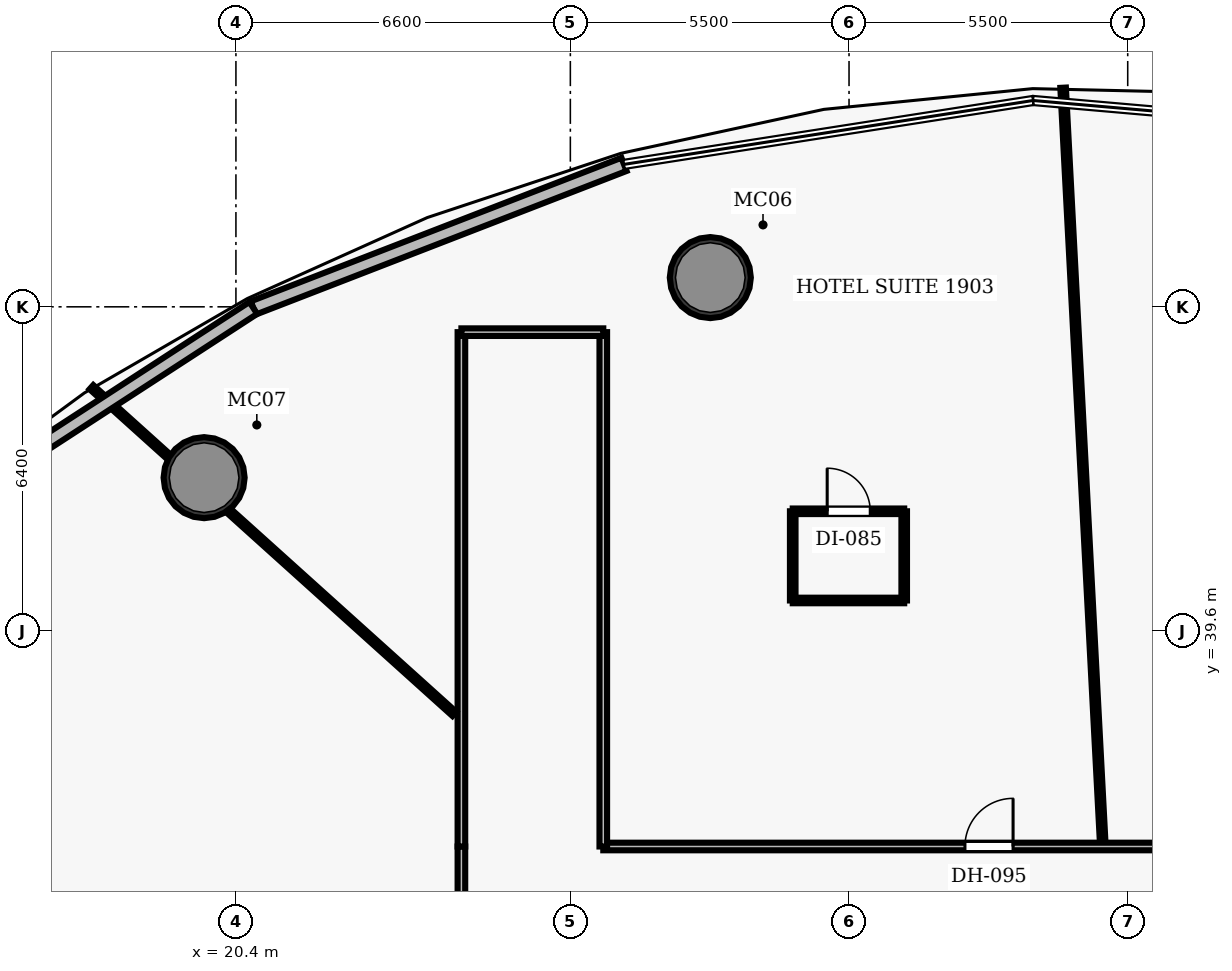
"""IFC4 building model, lengths in metres.
Left out: names, types, materials, properties, quantities, classifications, styles, units other than length and angle.
Written with IfcOpenShell. Run it as: python <this file> out.ifc"""

import sys

from ifc_helpers import new_model, si_unit, direction, frame, frame_2d, origin, origin_2d, place, context, subcontext, project, spatial, rectangle, hollow_circle, extrude, element, fill, save


model = new_model("IFC4")
c1 = context("Model", 3, precision=1e-05, world=origin(), true_north=direction((0.0, 1.0)))
c2 = subcontext(c1, "Body", "Model", "MODEL_VIEW")
j1 = project(units=[si_unit("LENGTHUNIT", "METRE"), si_unit("PLANEANGLEUNIT", "RADIAN")], contexts=[c1])
p1 = place(None, origin())
s1 = spatial("IfcSite", under=j1, at=p1, CompositionType="ELEMENT")
p2 = place(p1, origin())
s2 = spatial("IfcBuilding", under=s1, at=p2, CompositionType="ELEMENT")
p3 = place(p2, frame((0.0, 0.0, 83.4)))
s3 = spatial("IfcBuildingStorey", under=s2, at=p3, CompositionType="ELEMENT", Elevation=83.4)
for number, where, z_axis, x_axis in (
    (1, (29.762, 46.577, 0.0), (0.0, 0.0, 1.0), (1.0, 0.0, 0.0)),
    (2, (19.772, 42.629, 0.0), (0.0, 0.0, 1.0), (1.0, 0.0, 0.0)),
):
    element("IfcColumn", number, at=place(p3, frame(where, z_axis=z_axis, x_axis=x_axis)), inside=s3, PredefinedType="COLUMN", context=c2, shape_type="SweptSolid", body=[
        extrude(hollow_circle(Radius=0.8, WallThickness=0.06, at=origin_2d()), origin(), (0.0, 0.0, 1.0), 3.5),
    ])
p4 = place(p3, frame((27.65, 35.35, 0.0), z_axis=(0.0, 0.0, 1.0), x_axis=(1.0, 0.0, 0.0)))
e3 = element("IfcWall", 3, at=p4, inside=s3, PredefinedType="PARTITIONING", context=c2, shape_type="SweptSolid", body=[
    extrude(rectangle(XDim=23.5, YDim=0.15, at=frame_2d((11.75, 0.0))), origin(), (0.0, 0.0, 1.0), 2.6),
])
p5 = place(p4, frame((11.493, 0.0, 0.0)))
e4 = element("IfcOpeningElement", 4, at=p5, cuts=e3, PredefinedType="OPENING", context=c2, shape_type="SweptSolid", body=[
    extrude(rectangle(XDim=0.95, YDim=2.15, at=frame_2d((0.475, 1.075))), frame((0.0, 0.085, 0.0), z_axis=(0.0, -1.0, 0.0), x_axis=(1.0, 0.0, 0.0)), (0.0, 0.0, 1.0), 0.17),
])
p6 = place(p4, frame((7.137, 0.0, 0.0)))
e5 = element("IfcOpeningElement", 5, at=p6, cuts=e3, PredefinedType="OPENING", context=c2, shape_type="SweptSolid", body=[
    extrude(rectangle(XDim=0.95, YDim=2.15, at=frame_2d((0.475, 1.075))), frame((0.0, 0.085, 0.0), z_axis=(0.0, -1.0, 0.0), x_axis=(1.0, 0.0, 0.0)), (0.0, 0.0, 1.0), 0.17),
])
p7 = place(p3, frame((24.85, 19.45, 0.0), z_axis=(0.0, 0.0, 1.0), x_axis=(0.0, 1.0, 0.0)))
e6 = element("IfcWall", 6, at=p7, inside=s3, PredefinedType="PARTITIONING", context=c2, shape_type="SweptSolid", body=[
    extrude(rectangle(XDim=15.9, YDim=0.15, at=frame_2d((7.95, 0.0))), origin(), (0.0, 0.0, 1.0), 2.6),
])
p8 = place(p7, frame((7.669, 0.0, 0.0)))
e7 = element("IfcOpeningElement", 7, at=p8, cuts=e6, PredefinedType="OPENING", context=c2, shape_type="SweptSolid", body=[
    extrude(rectangle(XDim=0.95, YDim=2.15, at=frame_2d((0.475, 1.075))), frame((0.0, 0.085, 0.0), z_axis=(0.0, -1.0, 0.0), x_axis=(1.0, 0.0, 0.0)), (0.0, 0.0, 1.0), 0.17),
])
p9 = place(p7, frame((4.138, 0.0, 0.0)))
e8 = element("IfcOpeningElement", 8, at=p9, cuts=e6, PredefinedType="OPENING", context=c2, shape_type="SweptSolid", body=[
    extrude(rectangle(XDim=0.95, YDim=2.15, at=frame_2d((0.475, 1.075))), frame((0.0, 0.085, 0.0), z_axis=(0.0, -1.0, 0.0), x_axis=(1.0, 0.0, 0.0)), (0.0, 0.0, 1.0), 0.17),
])
for number, where, z_axis, x_axis in (
    (9, (24.85, 35.35, 0.0), (0.0, 0.0, 1.0), (0.0, 1.0, 0.0)),
    (10, (27.65, 35.35, 0.0), (0.0, 0.0, 1.0), (0.0, 1.0, 0.0)),
):
    element("IfcWall", number, at=place(p3, frame(where, z_axis=z_axis, x_axis=x_axis)), inside=s3, PredefinedType="PARTITIONING", context=c2, shape_type="SweptSolid", body=[
        extrude(rectangle(XDim=10.15, YDim=0.15, at=frame_2d((5.075, 0.0))), origin(), (0.0, 0.0, 1.0), 2.6),
    ])
p10 = place(p3, frame((24.85, 45.5, 0.0), z_axis=(0.0, 0.0, 1.0), x_axis=(1.0, 0.0, 0.0)))
e11 = element("IfcWall", 11, at=p10, inside=s3, PredefinedType="PARTITIONING", context=c2, shape_type="SweptSolid", body=[
    extrude(rectangle(XDim=2.8, YDim=0.15, at=frame_2d((1.4, 0.0))), origin(), (0.0, 0.0, 1.0), 2.6),
])
p11 = place(p3, frame((37.503, 35.49, 0.0), z_axis=(0.0, 0.0, 1.0), x_axis=(-0.052346625091, 0.998628975567, 0.0)))
e12 = element("IfcWall", 12, at=p11, inside=s3, PredefinedType="PARTITIONING", context=c2, shape_type="SweptSolid", body=[
    extrude(rectangle(XDim=14.854, YDim=0.11, at=frame_2d((7.427, 0.0))), origin(), (0.0, 0.0, 1.0), 2.6),
])
p12 = place(p3, frame((24.71, 37.966, 0.0), z_axis=(0.0, 0.0, 1.0), x_axis=(-0.743136670625, 0.669139663129, 0.0)))
e13 = element("IfcWall", 13, at=p12, inside=s3, PredefinedType="PARTITIONING", context=c2, shape_type="SweptSolid", body=[
    extrude(rectangle(XDim=9.637, YDim=0.11, at=frame_2d((4.819, 0.0))), origin(), (0.0, 0.0, 1.0), 2.6),
])
p13 = place(p3, frame((31.389, 40.205, 0.0), z_axis=(0.0, 0.0, 1.0), x_axis=(1.0, 0.0, 0.0)))
e14 = element("IfcWall", 14, at=p13, inside=s3, PredefinedType="PARTITIONING", context=c2, shape_type="SweptSolid", body=[
    extrude(rectangle(XDim=2.2, YDim=0.11, at=frame_2d((1.1, 0.0))), origin(), (0.0, 0.0, 1.0), 2.6),
])
p14 = place(p3, frame((31.389, 41.965, 0.0), z_axis=(0.0, 0.0, 1.0), x_axis=(1.0, 0.0, 0.0)))
e15 = element("IfcWall", 15, at=p14, inside=s3, PredefinedType="PARTITIONING", context=c2, shape_type="SweptSolid", body=[
    extrude(rectangle(XDim=2.2, YDim=0.11, at=frame_2d((1.1, 0.0))), origin(), (0.0, 0.0, 1.0), 2.6),
])
p15 = place(p14, frame((0.68, 0.0, 0.0)))
e16 = element("IfcOpeningElement", 16, at=p15, cuts=e15, PredefinedType="OPENING", context=c2, shape_type="SweptSolid", body=[
    extrude(rectangle(XDim=0.85, YDim=2.1, at=frame_2d((0.425, 1.05))), frame((0.0, 0.065, 0.0), z_axis=(0.0, -1.0, 0.0), x_axis=(1.0, 0.0, 0.0)), (0.0, 0.0, 1.0), 0.13),
])
for number, where, z_axis, x_axis in (
    (17, (31.389, 40.205, 0.0), (0.0, 0.0, 1.0), (0.0, 1.0, 0.0)),
    (18, (33.589, 40.205, 0.0), (0.0, 0.0, 1.0), (0.0, 1.0, 0.0)),
):
    element("IfcWall", number, at=place(p3, frame(where, z_axis=z_axis, x_axis=x_axis)), inside=s3, PredefinedType="PARTITIONING", context=c2, shape_type="SweptSolid", body=[
        extrude(rectangle(XDim=1.76, YDim=0.11, at=frame_2d((0.88, 0.0))), origin(), (0.0, 0.0, 1.0), 2.6),
    ])
p16 = place(p3, frame((20.743, 45.978, 0.0), z_axis=(0.0, 0.0, 1.0), x_axis=(0.932529903386, 0.361092757183, 0.0)))
e19 = element("IfcWall", 19, at=p16, inside=s3, PredefinedType="SOLIDWALL", context=c2, shape_type="SweptSolid", body=[
    extrude(rectangle(XDim=7.845, YDim=0.28, at=frame_2d((3.922, 0.0))), origin(), (0.0, 0.0, 1.0), 3.25),
])
p17 = place(p3, frame((14.754, 42.087, 0.0), z_axis=(0.0, 0.0, 1.0), x_axis=(0.838544340637, 0.544833358731, 0.0)))
e20 = element("IfcWall", 20, at=p17, inside=s3, PredefinedType="SOLIDWALL", context=c2, shape_type="SweptSolid", body=[
    extrude(rectangle(XDim=7.143, YDim=0.28, at=frame_2d((3.571, 0.0))), origin(), (0.0, 0.0, 1.0), 3.25),
])
p18 = place(p6, origin())
e21 = element("IfcDoor", 21, at=p18, inside=s3, OperationType="SINGLE_SWING_RIGHT", PredefinedType="DOOR", context=c2, shape_type="SweptSolid", body=[
    extrude(rectangle(XDim=0.95, YDim=2.15, at=frame_2d((0.475, 1.075))), frame((0.0, 0.025, 0.0), z_axis=(0.0, -1.0, 0.0), x_axis=(1.0, 0.0, 0.0)), (0.0, 0.0, 1.0), 0.05),
])
fill(e5, e21)
p19 = place(p15, origin())
e22 = element("IfcDoor", 22, at=p19, inside=s3, OperationType="SINGLE_SWING_LEFT", PredefinedType="DOOR", context=c2, shape_type="SweptSolid", body=[
    extrude(rectangle(XDim=0.85, YDim=2.1, at=frame_2d((0.425, 1.05))), frame((0.0, 0.025, 0.0), z_axis=(0.0, -1.0, 0.0), x_axis=(1.0, 0.0, 0.0)), (0.0, 0.0, 1.0), 0.05),
])
fill(e16, e22)
save(model, sys.argv[1])
